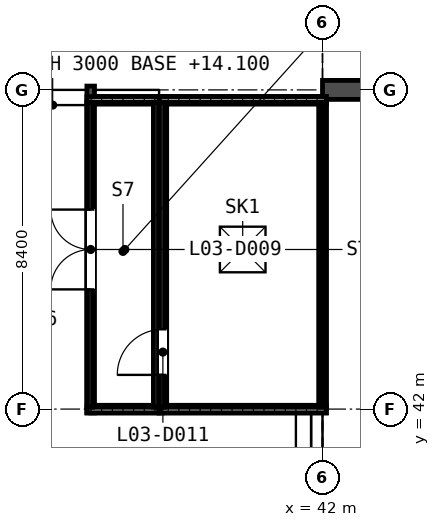
"""IFC4 building model, lengths in metres.
Left out: names, types, materials, properties, quantities, classifications, styles, units other than length and angle.
Written with IfcOpenShell. Run it as: python <this file> out.ifc"""

import sys

from ifc_helpers import new_model, si_unit, direction, frame, frame_2d, origin, origin_2d, place, context, subcontext, project, spatial, polyline, rectangle, outline, extrude, element, fill, save


model = new_model("IFC4")
c1 = context("Model", 3, precision=1e-05, world=origin(), true_north=direction((0.0, 1.0)))
c2 = subcontext(c1, "Body", "Model", "MODEL_VIEW")
j1 = project(units=[si_unit("LENGTHUNIT", "METRE"), si_unit("PLANEANGLEUNIT", "RADIAN")], contexts=[c1])
p1 = place(None, origin())
s1 = spatial("IfcSite", under=j1, at=p1, CompositionType="ELEMENT")
p2 = place(p1, origin())
s2 = spatial("IfcBuilding", under=s1, at=p2, CompositionType="ELEMENT")
p3 = place(p2, frame((0.0, 0.0, 14.4)))
s3 = spatial("IfcBuildingStorey", under=s2, at=p3, CompositionType="ELEMENT", Elevation=14.4)
p4 = place(p3, frame((42.0, 50.4, -0.3), z_axis=(0.0, 0.0, 1.0), x_axis=(1.0, 0.0, 0.0)))
e1 = element("IfcWall", 1, at=p4, inside=s3, PredefinedType="SHEAR", context=c2, shape_type="SweptSolid", body=[
    extrude(outline(polyline([(0.0, 0.0), (42.0, 0.0), (42.0, 0.05), (41.807, 0.05), (39.368, 3.65), (36.232, 3.65), (33.793, 0.05), (33.6, 0.05), (33.407, 0.05), (30.968, 3.65), (27.832, 3.65), (25.393, 0.05), (25.2, 0.05), (25.007, 0.05), (22.568, 3.65), (19.432, 3.65), (16.993, 0.05), (16.8, 0.05), (16.607, 0.05), (14.168, 3.65), (11.032, 3.65), (8.593, 0.05), (8.4, 0.05), (8.207, 0.05), (5.768, 3.65), (2.632, 3.65), (0.193, 0.05), (0.0, 0.05), (0.0, 0.0)])), frame((0.0, 0.25, 0.0), z_axis=(0.0, -1.0, 0.0), x_axis=(1.0, 0.0, 0.0)), (0.0, 0.0, 1.0), 0.5),
])
for number, where, z_axis, x_axis in (
    (2, (37.7, 42.0, -0.3), (0.0, 0.0, 1.0), (1.0, 0.0, 0.0)),
    (3, (37.7, 50.125, -0.3), (0.0, 0.0, 1.0), (1.0, 0.0, 0.0)),
):
    element("IfcWall", number, at=place(p3, frame(where, z_axis=z_axis, x_axis=x_axis)), inside=s3, PredefinedType="SHEAR", context=c2, shape_type="SweptSolid", body=[
        extrude(rectangle(XDim=4.4, YDim=0.2, at=frame_2d((2.2, 0.0))), origin(), (0.0, 0.0, 1.0), 3.0),
    ])
p5 = place(p3, frame((37.8, 42.1, -0.3), z_axis=(0.0, 0.0, 1.0), x_axis=(0.0, 1.0, 0.0)))
e4 = element("IfcWall", 4, at=p5, inside=s3, PredefinedType="SHEAR", context=c2, shape_type="SweptSolid", body=[
    extrude(rectangle(XDim=7.925, YDim=0.2, at=frame_2d((3.962, 0.0))), origin(), (0.0, 0.0, 1.0), 3.0),
])
p6 = place(p5, frame((0.8, 0.0, 0.3)))
e5 = element("IfcOpeningElement", 5, at=p6, cuts=e4, PredefinedType="OPENING", context=c2, shape_type="SweptSolid", body=[
    extrude(rectangle(XDim=1.2, YDim=2.2, at=frame_2d((0.6, 1.1))), frame((0.0, 0.11, 0.0), z_axis=(0.0, -1.0, 0.0), x_axis=(1.0, 0.0, 0.0)), (0.0, 0.0, 1.0), 0.22),
])
p7 = place(p3, frame((42.0, 42.1, -0.3), z_axis=(0.0, 0.0, 1.0), x_axis=(0.0, 1.0, 0.0)))
e6 = element("IfcWall", 6, at=p7, inside=s3, PredefinedType="SHEAR", context=c2, shape_type="SweptSolid", body=[
    extrude(rectangle(XDim=7.925, YDim=0.2, at=frame_2d((3.962, 0.0))), origin(), (0.0, 0.0, 1.0), 3.0),
])
for number, where, z_axis, x_axis in (
    (7, (37.8, 42.0, -0.3), (0.0, 0.0, 1.0), (-1.0, 0.0, 0.0)),
    (8, (37.8, 50.125, -0.3), (0.0, 0.0, 1.0), (-1.0, 0.0, 0.0)),
):
    element("IfcWall", number, at=place(p3, frame(where, z_axis=z_axis, x_axis=x_axis)), inside=s3, PredefinedType="SHEAR", context=c2, shape_type="SweptSolid", body=[
        extrude(rectangle(XDim=1.9, YDim=0.2, at=frame_2d((0.95, 0.0))), origin(), (0.0, 0.0, 1.0), 3.0),
    ])
p8 = place(p3, frame((35.9, 41.9, -0.3), z_axis=(0.0, 0.0, 1.0), x_axis=(0.0, 1.0, 0.0)))
e9 = element("IfcWall", 9, at=p8, inside=s3, PredefinedType="SHEAR", context=c2, shape_type="SweptSolid", body=[
    extrude(rectangle(XDim=8.6, YDim=0.2, at=frame_2d((4.3, 0.0))), origin(), (0.0, 0.0, 1.0), 3.0),
])
p9 = place(p8, frame((3.25, 0.0, 0.3)))
e10 = element("IfcOpeningElement", 10, at=p9, cuts=e9, PredefinedType="OPENING", context=c2, shape_type="SweptSolid", body=[
    extrude(rectangle(XDim=2.1, YDim=2.2, at=frame_2d((1.05, 1.1))), frame((0.0, 0.11, 0.0), z_axis=(0.0, -1.0, 0.0), x_axis=(1.0, 0.0, 0.0)), (0.0, 0.0, 1.0), 0.22),
])
for number, where, z_axis, x_axis in (
    (11, (37.7, 41.975, 2.9), (0.0, 0.0, 1.0), (1.0, 0.0, 0.0)),
    (12, (37.7, 50.15, 2.9), (0.0, 0.0, 1.0), (1.0, 0.0, 0.0)),
):
    element("IfcWall", number, at=place(p3, frame(where, z_axis=z_axis, x_axis=x_axis)), inside=s3, PredefinedType="PARAPET", context=c2, shape_type="SweptSolid", body=[
        extrude(rectangle(XDim=4.4, YDim=0.15, at=frame_2d((2.2, 0.0))), origin(), (0.0, 0.0, 1.0), 0.45),
    ])
for number, where, z_axis, x_axis in (
    (13, (37.775, 42.05, 2.9), (0.0, 0.0, 1.0), (0.0, 1.0, 0.0)),
    (14, (42.025, 42.05, 2.9), (0.0, 0.0, 1.0), (0.0, 1.0, 0.0)),
):
    element("IfcWall", number, at=place(p3, frame(where, z_axis=z_axis, x_axis=x_axis)), inside=s3, PredefinedType="PARAPET", context=c2, shape_type="SweptSolid", body=[
        extrude(rectangle(XDim=8.025, YDim=0.15, at=frame_2d((4.012, 0.0))), origin(), (0.0, 0.0, 1.0), 0.45),
    ])
for number, where, z_axis, x_axis in (
    (15, (35.8, 41.975, 2.9), (0.0, 0.0, 1.0), (1.0, 0.0, 0.0)),
    (16, (35.8, 50.15, 2.9), (0.0, 0.0, 1.0), (1.0, 0.0, 0.0)),
):
    element("IfcWall", number, at=place(p3, frame(where, z_axis=z_axis, x_axis=x_axis)), inside=s3, PredefinedType="PARAPET", context=c2, shape_type="SweptSolid", body=[
        extrude(rectangle(XDim=1.9, YDim=0.15, at=frame_2d((0.95, 0.0))), origin(), (0.0, 0.0, 1.0), 0.45),
    ])
for number, where, z_axis, x_axis in (
    (17, (35.875, 42.05, 2.9), (0.0, 0.0, 1.0), (0.0, 1.0, 0.0)),
    (18, (37.625, 42.05, 2.9), (0.0, 0.0, 1.0), (0.0, 1.0, 0.0)),
):
    element("IfcWall", number, at=place(p3, frame(where, z_axis=z_axis, x_axis=x_axis)), inside=s3, PredefinedType="PARAPET", context=c2, shape_type="SweptSolid", body=[
        extrude(rectangle(XDim=8.025, YDim=0.15, at=frame_2d((4.012, 0.0))), origin(), (0.0, 0.0, 1.0), 0.45),
    ])
p10 = place(p9, origin())
e19 = element("IfcDoor", 19, at=p10, inside=s3, OperationType="DOUBLE_DOOR_SINGLE_SWING", PredefinedType="DOOR", context=c2, shape_type="SweptSolid", body=[
    extrude(rectangle(XDim=2.1, YDim=0.013, at=frame_2d((1.05, 0.007))), frame((0.0, 0.088, 0.0), z_axis=(0.0, -1.0, 0.0), x_axis=(1.0, 0.0, 0.0)), (0.0, 0.0, 1.0), 0.176),
    extrude(rectangle(XDim=0.075, YDim=2.112, at=frame_2d((0.038, 1.069))), frame((0.0, 0.098, 0.0), z_axis=(0.0, -1.0, 0.0), x_axis=(1.0, 0.0, 0.0)), (0.0, 0.0, 1.0), 0.196),
    extrude(rectangle(XDim=0.075, YDim=2.112, at=frame_2d((2.062, 1.069))), frame((0.0, 0.098, 0.0), z_axis=(0.0, -1.0, 0.0), x_axis=(1.0, 0.0, 0.0)), (0.0, 0.0, 1.0), 0.196),
    extrude(rectangle(XDim=2.1, YDim=0.075, at=frame_2d((1.05, 2.163))), frame((0.0, 0.088, 0.0), z_axis=(0.0, -1.0, 0.0), x_axis=(1.0, 0.0, 0.0)), (0.0, 0.0, 1.0), 0.176),
    extrude(rectangle(XDim=1.95, YDim=2.112, at=frame_2d((1.05, 1.069))), frame((0.0, 0.025, 0.0), z_axis=(0.0, -1.0, 0.0), x_axis=(1.0, 0.0, 0.0)), (0.0, 0.0, 1.0), 0.05),
])
fill(e10, e19)
p11 = place(p6, origin())
e20 = element("IfcDoor", 20, at=p11, inside=s3, OperationType="SINGLE_SWING_RIGHT", PredefinedType="DOOR", context=c2, shape_type="SweptSolid", body=[
    extrude(rectangle(XDim=1.2, YDim=2.2, at=frame_2d((0.6, 1.1))), frame((0.0, 0.025, 0.0), z_axis=(0.0, -1.0, 0.0), x_axis=(1.0, 0.0, 0.0)), (0.0, 0.0, 1.0), 0.05),
])
fill(e5, e20)
p12 = place(p3, frame((0.0, 0.0, 2.7)))
p13 = place(p12, frame((39.9, 46.2, 0.0)))
p14 = place(p13, frame((0.0, 0.0, 0.15)))
e21 = element("IfcWindow", 21, at=p14, inside=s3, PartitioningType="SINGLE_PANEL", PredefinedType="SKYLIGHT", context=c2, shape_type="SweptSolid", body=[
    extrude(rectangle(XDim=1.2, YDim=1.2, at=origin_2d()), origin(), (0.0, 0.0, 1.0), 0.05),
])
save(model, sys.argv[1])
